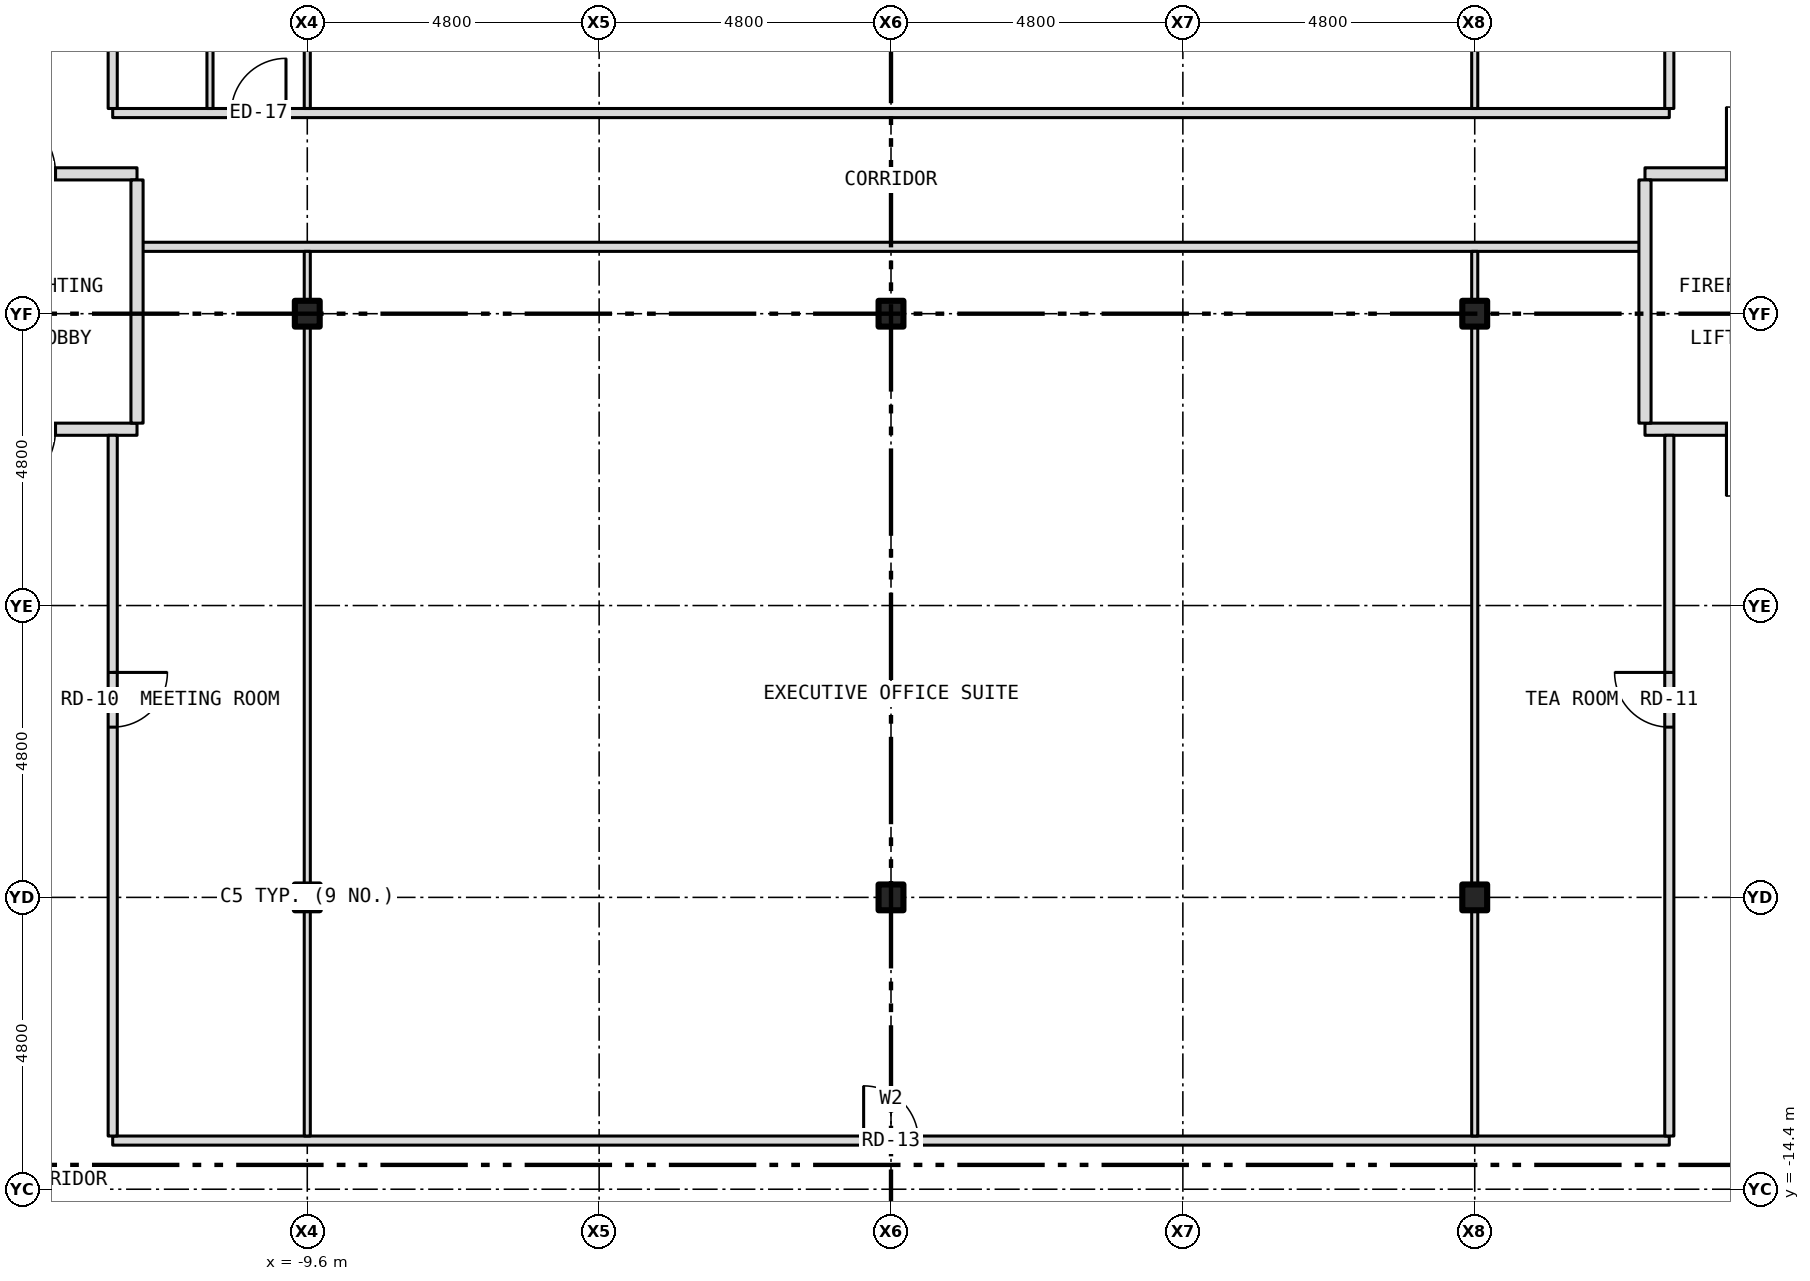
"""IFC4 building model, lengths in metres.
Left out: names, types, materials, properties, quantities, classifications, styles, units other than length and angle.
Written with IfcOpenShell. Run it as: python <this file> out.ifc"""

import sys

from ifc_helpers import new_model, si_unit, direction, frame, frame_2d, origin, origin_2d, place, context, subcontext, project, spatial, rectangle, i_section, extrude, element, fill, save


model = new_model("IFC4")
c1 = context("Model", 3, precision=1e-05, world=origin(), true_north=direction((0.0, 1.0)))
c2 = subcontext(c1, "Body", "Model", "MODEL_VIEW")
j1 = project(units=[si_unit("LENGTHUNIT", "METRE"), si_unit("PLANEANGLEUNIT", "RADIAN")], contexts=[c1])
p1 = place(None, origin())
s1 = spatial("IfcSite", under=j1, at=p1, CompositionType="ELEMENT")
p2 = place(p1, origin())
s2 = spatial("IfcBuilding", under=s1, at=p2, CompositionType="ELEMENT")
p3 = place(p2, frame((0.0, 0.0, 46.0)))
s3 = spatial("IfcBuildingStorey", under=s2, at=p3, CompositionType="ELEMENT", Elevation=46.0)
for number, where, z_axis, x_axis in (
    (1, (-9.6, -9.6, -0.15), (0.0, 0.0, 1.0), (1.0, 0.0, 0.0)),
    (2, (-9.6, 0.0, -0.15), (0.0, 0.0, 1.0), (1.0, 0.0, 0.0)),
    (3, (0.0, -9.6, -0.15), (0.0, 0.0, 1.0), (1.0, 0.0, 0.0)),
    (4, (0.0, 0.0, -0.15), (0.0, 0.0, 1.0), (1.0, 0.0, 0.0)),
    (5, (9.6, -9.6, -0.15), (0.0, 0.0, 1.0), (1.0, 0.0, 0.0)),
    (6, (9.6, 0.0, -0.15), (0.0, 0.0, 1.0), (1.0, 0.0, 0.0)),
):
    element("IfcColumn", number, at=place(p3, frame(where, z_axis=z_axis, x_axis=x_axis)), inside=s3, PredefinedType="COLUMN", context=c2, shape_type="SweptSolid", body=[
        extrude(i_section(OverallWidth=0.409, OverallDepth=0.424, WebThickness=0.033, FlangeThickness=0.052, at=origin_2d()), origin(), (0.0, 0.0, 1.0), 3.5),
    ])
p4 = place(p3, frame((-12.8, -13.6, 0.0), z_axis=(0.0, 0.0, 1.0), x_axis=(1.0, 0.0, 0.0)))
e7 = element("IfcWall", 7, at=p4, inside=s3, PredefinedType="PARTITIONING", context=c2, shape_type="SweptSolid", body=[
    extrude(rectangle(XDim=25.6, YDim=0.15, at=frame_2d((12.8, 0.0))), origin(), (0.0, 0.0, 1.0), 3.35),
])
p5 = place(p4, frame((12.35, 0.0, 0.0)))
e8 = element("IfcOpeningElement", 8, at=p5, cuts=e7, PredefinedType="OPENING", context=c2, shape_type="SweptSolid", body=[
    extrude(rectangle(XDim=0.9, YDim=2.1, at=frame_2d((0.45, 1.05))), frame((0.0, 0.087, 0.0), z_axis=(0.0, -1.0, 0.0), x_axis=(1.0, 0.0, 0.0)), (0.0, 0.0, 1.0), 0.174),
])
p6 = place(p3, frame((-15.68, -1.9, 0.0), z_axis=(0.0, 0.0, 1.0), x_axis=(1.0, 0.0, 0.0)))
e9 = element("IfcWall", 9, at=p6, inside=s3, PredefinedType="PARTITIONING", context=c2, shape_type="SweptSolid", body=[
    extrude(rectangle(XDim=3.28, YDim=0.2, at=frame_2d((1.64, 0.0))), origin(), (0.0, 0.0, 1.0), 3.35),
])
p7 = place(p6, frame((0.84, 0.0, 0.0)))
e10 = element("IfcOpeningElement", 10, at=p7, cuts=e9, PredefinedType="OPENING", context=c2, shape_type="SweptSolid", body=[
    extrude(rectangle(XDim=1.1, YDim=2.1, at=frame_2d((0.55, 1.05))), frame((0.0, 0.112, 0.0), z_axis=(0.0, -1.0, 0.0), x_axis=(1.0, 0.0, 0.0)), (0.0, 0.0, 1.0), 0.224),
])
p8 = place(p3, frame((12.4, -1.9, 0.0), z_axis=(0.0, 0.0, 1.0), x_axis=(1.0, 0.0, 0.0)))
e11 = element("IfcWall", 11, at=p8, inside=s3, PredefinedType="PARTITIONING", context=c2, shape_type="SweptSolid", body=[
    extrude(rectangle(XDim=3.28, YDim=0.2, at=frame_2d((1.64, 0.0))), origin(), (0.0, 0.0, 1.0), 3.35),
])
p9 = place(p8, frame((1.34, 0.0, 0.0)))
e12 = element("IfcOpeningElement", 12, at=p9, cuts=e11, PredefinedType="OPENING", context=c2, shape_type="SweptSolid", body=[
    extrude(rectangle(XDim=1.1, YDim=2.1, at=frame_2d((0.55, 1.05))), frame((0.0, 0.112, 0.0), z_axis=(0.0, -1.0, 0.0), x_axis=(1.0, 0.0, 0.0)), (0.0, 0.0, 1.0), 0.224),
])
p10 = place(p3, frame((-12.4, 1.1, 0.0), z_axis=(0.0, 0.0, 1.0), x_axis=(1.0, 0.0, 0.0)))
e13 = element("IfcWall", 13, at=p10, inside=s3, PredefinedType="PARTITIONING", context=c2, shape_type="SweptSolid", body=[
    extrude(rectangle(XDim=24.8, YDim=0.15, at=frame_2d((12.4, 0.0))), origin(), (0.0, 0.0, 1.0), 3.35),
])
p11 = place(p3, frame((-15.68, 2.3, 0.0), z_axis=(0.0, 0.0, 1.0), x_axis=(1.0, 0.0, 0.0)))
e14 = element("IfcWall", 14, at=p11, inside=s3, PredefinedType="PARTITIONING", context=c2, shape_type="SweptSolid", body=[
    extrude(rectangle(XDim=3.28, YDim=0.2, at=frame_2d((1.64, 0.0))), origin(), (0.0, 0.0, 1.0), 3.35),
])
p12 = place(p11, frame((0.84, 0.0, 0.0)))
e15 = element("IfcOpeningElement", 15, at=p12, cuts=e14, PredefinedType="OPENING", context=c2, shape_type="SweptSolid", body=[
    extrude(rectangle(XDim=1.1, YDim=2.1, at=frame_2d((0.55, 1.05))), frame((0.0, 0.112, 0.0), z_axis=(0.0, -1.0, 0.0), x_axis=(1.0, 0.0, 0.0)), (0.0, 0.0, 1.0), 0.224),
])
p13 = place(p3, frame((12.4, 2.3, 0.0), z_axis=(0.0, 0.0, 1.0), x_axis=(1.0, 0.0, 0.0)))
e16 = element("IfcWall", 16, at=p13, inside=s3, PredefinedType="PARTITIONING", context=c2, shape_type="SweptSolid", body=[
    extrude(rectangle(XDim=3.28, YDim=0.2, at=frame_2d((1.64, 0.0))), origin(), (0.0, 0.0, 1.0), 3.35),
])
p14 = place(p13, frame((1.34, 0.0, 0.0)))
e17 = element("IfcOpeningElement", 17, at=p14, cuts=e16, PredefinedType="OPENING", context=c2, shape_type="SweptSolid", body=[
    extrude(rectangle(XDim=1.1, YDim=2.1, at=frame_2d((0.55, 1.05))), frame((0.0, 0.112, 0.0), z_axis=(0.0, -1.0, 0.0), x_axis=(1.0, 0.0, 0.0)), (0.0, 0.0, 1.0), 0.224),
])
p15 = place(p3, frame((-12.8, 3.3, 0.0), z_axis=(0.0, 0.0, 1.0), x_axis=(1.0, 0.0, 0.0)))
e18 = element("IfcWall", 18, at=p15, inside=s3, PredefinedType="PARTITIONING", context=c2, shape_type="SweptSolid", body=[
    extrude(rectangle(XDim=25.6, YDim=0.15, at=frame_2d((12.8, 0.0))), origin(), (0.0, 0.0, 1.0), 3.35),
])
p16 = place(p15, frame((1.95, 0.0, 0.0)))
e19 = element("IfcOpeningElement", 19, at=p16, cuts=e18, PredefinedType="OPENING", context=c2, shape_type="SweptSolid", body=[
    extrude(rectangle(XDim=0.9, YDim=2.1, at=frame_2d((0.45, 1.05))), frame((0.0, 0.087, 0.0), z_axis=(0.0, -1.0, 0.0), x_axis=(1.0, 0.0, 0.0)), (0.0, 0.0, 1.0), 0.174),
])
p17 = place(p3, frame((-12.8, -13.525, 0.0), z_axis=(0.0, 0.0, 1.0), x_axis=(0.0, 1.0, 0.0)))
e20 = element("IfcWall", 20, at=p17, inside=s3, PredefinedType="PARTITIONING", context=c2, shape_type="SweptSolid", body=[
    extrude(rectangle(XDim=11.525, YDim=0.15, at=frame_2d((5.762, 0.0))), origin(), (0.0, 0.0, 1.0), 3.35),
])
p18 = place(p17, frame((6.725, 0.0, 0.0)))
e21 = element("IfcOpeningElement", 21, at=p18, cuts=e20, PredefinedType="OPENING", context=c2, shape_type="SweptSolid", body=[
    extrude(rectangle(XDim=0.9, YDim=2.1, at=frame_2d((0.45, 1.05))), frame((0.0, 0.087, 0.0), z_axis=(0.0, -1.0, 0.0), x_axis=(1.0, 0.0, 0.0)), (0.0, 0.0, 1.0), 0.174),
])
p19 = place(p3, frame((-12.8, 3.375, 0.0), z_axis=(0.0, 0.0, 1.0), x_axis=(0.0, 1.0, 0.0)))
e22 = element("IfcWall", 22, at=p19, inside=s3, PredefinedType="PARTITIONING", context=c2, shape_type="SweptSolid", body=[
    extrude(rectangle(XDim=7.275, YDim=0.15, at=frame_2d((3.637, 0.0))), origin(), (0.0, 0.0, 1.0), 3.35),
])
p20 = place(p19, frame((3.175, 0.0, 0.0)))
e23 = element("IfcOpeningElement", 23, at=p20, cuts=e22, PredefinedType="OPENING", context=c2, shape_type="SweptSolid", body=[
    extrude(rectangle(XDim=0.9, YDim=2.1, at=frame_2d((0.45, 1.05))), frame((0.0, 0.087, 0.0), z_axis=(0.0, -1.0, 0.0), x_axis=(1.0, 0.0, 0.0)), (0.0, 0.0, 1.0), 0.174),
])
p21 = place(p3, frame((-12.4, -1.8, 0.0), z_axis=(0.0, 0.0, 1.0), x_axis=(0.0, 1.0, 0.0)))
e24 = element("IfcWall", 24, at=p21, inside=s3, PredefinedType="PARTITIONING", context=c2, shape_type="SweptSolid", body=[
    extrude(rectangle(XDim=4.0, YDim=0.2, at=frame_2d((2.0, 0.0))), origin(), (0.0, 0.0, 1.0), 3.35),
])
p22 = place(p3, frame((-11.2, 3.375, 0.0), z_axis=(0.0, 0.0, 1.0), x_axis=(0.0, 1.0, 0.0)))
e25 = element("IfcWall", 25, at=p22, inside=s3, PredefinedType="PARTITIONING", context=c2, shape_type="SweptSolid", body=[
    extrude(rectangle(XDim=10.15, YDim=0.1, at=frame_2d((5.075, 0.0))), origin(), (0.0, 0.0, 1.0), 3.35),
])
p23 = place(p3, frame((-9.6, -13.525, 0.0), z_axis=(0.0, 0.0, 1.0), x_axis=(0.0, 1.0, 0.0)))
e26 = element("IfcWall", 26, at=p23, inside=s3, PredefinedType="PARTITIONING", context=c2, shape_type="SweptSolid", body=[
    extrude(rectangle(XDim=3.721, YDim=0.1, at=frame_2d((1.86, 0.0))), origin(), (0.0, 0.0, 1.0), 2.728),
])
p24 = place(p3, frame((-9.6, -9.804, 0.0), z_axis=(0.0, 0.0, 1.0), x_axis=(0.0, 1.0, 0.0)))
e27 = element("IfcWall", 27, at=p24, inside=s3, PredefinedType="PARTITIONING", context=c2, shape_type="SweptSolid", body=[
    extrude(rectangle(XDim=0.408, YDim=0.1, at=frame_2d((0.204, 0.0))), origin(), (0.0, 0.0, 1.0), 3.35),
])
p25 = place(p3, frame((-9.6, -9.396, 0.0), z_axis=(0.0, 0.0, 1.0), x_axis=(0.0, 1.0, 0.0)))
e28 = element("IfcWall", 28, at=p25, inside=s3, PredefinedType="PARTITIONING", context=c2, shape_type="SweptSolid", body=[
    extrude(rectangle(XDim=9.192, YDim=0.1, at=frame_2d((4.596, 0.0))), origin(), (0.0, 0.0, 1.0), 2.728),
])
p26 = place(p3, frame((-9.6, -0.204, 0.0), z_axis=(0.0, 0.0, 1.0), x_axis=(0.0, 1.0, 0.0)))
e29 = element("IfcWall", 29, at=p26, inside=s3, PredefinedType="PARTITIONING", context=c2, shape_type="SweptSolid", body=[
    extrude(rectangle(XDim=0.408, YDim=0.1, at=frame_2d((0.204, 0.0))), origin(), (0.0, 0.0, 1.0), 3.35),
])
p27 = place(p3, frame((-9.6, 0.204, 0.0), z_axis=(0.0, 0.0, 1.0), x_axis=(0.0, 1.0, 0.0)))
e30 = element("IfcWall", 30, at=p27, inside=s3, PredefinedType="PARTITIONING", context=c2, shape_type="SweptSolid", body=[
    extrude(rectangle(XDim=0.821, YDim=0.1, at=frame_2d((0.41, 0.0))), origin(), (0.0, 0.0, 1.0), 2.728),
])
p28 = place(p3, frame((-9.6, 3.375, 0.0), z_axis=(0.0, 0.0, 1.0), x_axis=(0.0, 1.0, 0.0)))
e31 = element("IfcWall", 31, at=p28, inside=s3, PredefinedType="PARTITIONING", context=c2, shape_type="SweptSolid", body=[
    extrude(rectangle(XDim=6.021, YDim=0.1, at=frame_2d((3.01, 0.0))), origin(), (0.0, 0.0, 1.0), 2.728),
])
p29 = place(p3, frame((9.6, -13.525, 0.0), z_axis=(0.0, 0.0, 1.0), x_axis=(0.0, 1.0, 0.0)))
e32 = element("IfcWall", 32, at=p29, inside=s3, PredefinedType="PARTITIONING", context=c2, shape_type="SweptSolid", body=[
    extrude(rectangle(XDim=3.721, YDim=0.1, at=frame_2d((1.86, 0.0))), origin(), (0.0, 0.0, 1.0), 2.728),
])
p30 = place(p3, frame((9.6, -9.804, 0.0), z_axis=(0.0, 0.0, 1.0), x_axis=(0.0, 1.0, 0.0)))
e33 = element("IfcWall", 33, at=p30, inside=s3, PredefinedType="PARTITIONING", context=c2, shape_type="SweptSolid", body=[
    extrude(rectangle(XDim=0.408, YDim=0.1, at=frame_2d((0.204, 0.0))), origin(), (0.0, 0.0, 1.0), 3.35),
])
p31 = place(p3, frame((9.6, -9.396, 0.0), z_axis=(0.0, 0.0, 1.0), x_axis=(0.0, 1.0, 0.0)))
e34 = element("IfcWall", 34, at=p31, inside=s3, PredefinedType="PARTITIONING", context=c2, shape_type="SweptSolid", body=[
    extrude(rectangle(XDim=9.192, YDim=0.1, at=frame_2d((4.596, 0.0))), origin(), (0.0, 0.0, 1.0), 2.728),
])
p32 = place(p3, frame((9.6, -0.204, 0.0), z_axis=(0.0, 0.0, 1.0), x_axis=(0.0, 1.0, 0.0)))
e35 = element("IfcWall", 35, at=p32, inside=s3, PredefinedType="PARTITIONING", context=c2, shape_type="SweptSolid", body=[
    extrude(rectangle(XDim=0.408, YDim=0.1, at=frame_2d((0.204, 0.0))), origin(), (0.0, 0.0, 1.0), 3.35),
])
p33 = place(p3, frame((9.6, 0.204, 0.0), z_axis=(0.0, 0.0, 1.0), x_axis=(0.0, 1.0, 0.0)))
e36 = element("IfcWall", 36, at=p33, inside=s3, PredefinedType="PARTITIONING", context=c2, shape_type="SweptSolid", body=[
    extrude(rectangle(XDim=0.821, YDim=0.1, at=frame_2d((0.41, 0.0))), origin(), (0.0, 0.0, 1.0), 2.728),
])
p34 = place(p3, frame((9.6, 3.375, 0.0), z_axis=(0.0, 0.0, 1.0), x_axis=(0.0, 1.0, 0.0)))
e37 = element("IfcWall", 37, at=p34, inside=s3, PredefinedType="PARTITIONING", context=c2, shape_type="SweptSolid", body=[
    extrude(rectangle(XDim=6.021, YDim=0.1, at=frame_2d((3.01, 0.0))), origin(), (0.0, 0.0, 1.0), 2.728),
])
p35 = place(p3, frame((12.4, -1.8, 0.0), z_axis=(0.0, 0.0, 1.0), x_axis=(0.0, 1.0, 0.0)))
e38 = element("IfcWall", 38, at=p35, inside=s3, PredefinedType="PARTITIONING", context=c2, shape_type="SweptSolid", body=[
    extrude(rectangle(XDim=4.0, YDim=0.2, at=frame_2d((2.0, 0.0))), origin(), (0.0, 0.0, 1.0), 3.35),
])
p36 = place(p3, frame((12.8, -13.525, 0.0), z_axis=(0.0, 0.0, 1.0), x_axis=(0.0, 1.0, 0.0)))
e39 = element("IfcWall", 39, at=p36, inside=s3, PredefinedType="PARTITIONING", context=c2, shape_type="SweptSolid", body=[
    extrude(rectangle(XDim=11.525, YDim=0.15, at=frame_2d((5.762, 0.0))), origin(), (0.0, 0.0, 1.0), 3.35),
])
p37 = place(p36, frame((6.725, 0.0, 0.0)))
e40 = element("IfcOpeningElement", 40, at=p37, cuts=e39, PredefinedType="OPENING", context=c2, shape_type="SweptSolid", body=[
    extrude(rectangle(XDim=0.9, YDim=2.1, at=frame_2d((0.45, 1.05))), frame((0.0, 0.087, 0.0), z_axis=(0.0, -1.0, 0.0), x_axis=(1.0, 0.0, 0.0)), (0.0, 0.0, 1.0), 0.174),
])
p38 = place(p3, frame((12.8, 3.375, 0.0), z_axis=(0.0, 0.0, 1.0), x_axis=(0.0, 1.0, 0.0)))
e41 = element("IfcWall", 41, at=p38, inside=s3, PredefinedType="PARTITIONING", context=c2, shape_type="SweptSolid", body=[
    extrude(rectangle(XDim=7.275, YDim=0.15, at=frame_2d((3.637, 0.0))), origin(), (0.0, 0.0, 1.0), 3.35),
])
p39 = place(p38, frame((3.175, 0.0, 0.0)))
e42 = element("IfcOpeningElement", 42, at=p39, cuts=e41, PredefinedType="OPENING", context=c2, shape_type="SweptSolid", body=[
    extrude(rectangle(XDim=0.9, YDim=2.1, at=frame_2d((0.45, 1.05))), frame((0.0, 0.087, 0.0), z_axis=(0.0, -1.0, 0.0), x_axis=(1.0, 0.0, 0.0)), (0.0, 0.0, 1.0), 0.174),
])
p40 = place(p12, origin())
e43 = element("IfcDoor", 43, at=p40, inside=s3, OperationType="SINGLE_SWING_LEFT", PredefinedType="DOOR", context=c2, shape_type="SweptSolid", body=[
    extrude(rectangle(XDim=1.1, YDim=2.1, at=frame_2d((0.55, 1.05))), frame((0.0, 0.025, 0.0), z_axis=(0.0, -1.0, 0.0), x_axis=(1.0, 0.0, 0.0)), (0.0, 0.0, 1.0), 0.05),
])
fill(e15, e43)
p41 = place(p7, origin())
e44 = element("IfcDoor", 44, at=p41, inside=s3, OperationType="SINGLE_SWING_LEFT", PredefinedType="DOOR", context=c2, shape_type="SweptSolid", body=[
    extrude(rectangle(XDim=1.1, YDim=2.1, at=frame_2d((0.55, 1.05))), frame((0.0, 0.025, 0.0), z_axis=(0.0, -1.0, 0.0), x_axis=(1.0, 0.0, 0.0)), (0.0, 0.0, 1.0), 0.05),
])
fill(e10, e44)
p42 = place(p14, origin())
e45 = element("IfcDoor", 45, at=p42, inside=s3, OperationType="SINGLE_SWING_LEFT", PredefinedType="DOOR", context=c2, shape_type="SweptSolid", body=[
    extrude(rectangle(XDim=1.1, YDim=2.1, at=frame_2d((0.55, 1.05))), frame((0.0, 0.025, 0.0), z_axis=(0.0, -1.0, 0.0), x_axis=(1.0, 0.0, 0.0)), (0.0, 0.0, 1.0), 0.05),
])
fill(e17, e45)
p43 = place(p9, origin())
e46 = element("IfcDoor", 46, at=p43, inside=s3, OperationType="SINGLE_SWING_LEFT", PredefinedType="DOOR", context=c2, shape_type="SweptSolid", body=[
    extrude(rectangle(XDim=1.1, YDim=2.1, at=frame_2d((0.55, 1.05))), frame((0.0, 0.025, 0.0), z_axis=(0.0, -1.0, 0.0), x_axis=(1.0, 0.0, 0.0)), (0.0, 0.0, 1.0), 0.05),
])
fill(e12, e46)
p44 = place(p16, origin())
e47 = element("IfcDoor", 47, at=p44, inside=s3, OperationType="SINGLE_SWING_RIGHT", PredefinedType="DOOR", context=c2, shape_type="SweptSolid", body=[
    extrude(rectangle(XDim=0.9, YDim=2.1, at=frame_2d((0.45, 1.05))), frame((0.0, 0.025, 0.0), z_axis=(0.0, -1.0, 0.0), x_axis=(1.0, 0.0, 0.0)), (0.0, 0.0, 1.0), 0.05),
])
fill(e19, e47)
p45 = place(p18, origin())
e48 = element("IfcDoor", 48, at=p45, inside=s3, OperationType="SINGLE_SWING_RIGHT", PredefinedType="DOOR", context=c2, shape_type="SweptSolid", body=[
    extrude(rectangle(XDim=0.9, YDim=2.1, at=frame_2d((0.45, 1.05))), frame((0.0, 0.025, 0.0), z_axis=(0.0, -1.0, 0.0), x_axis=(1.0, 0.0, 0.0)), (0.0, 0.0, 1.0), 0.05),
])
fill(e21, e48)
p46 = place(p37, origin())
e49 = element("IfcDoor", 49, at=p46, inside=s3, OperationType="SINGLE_SWING_RIGHT", PredefinedType="DOOR", context=c2, shape_type="SweptSolid", body=[
    extrude(rectangle(XDim=0.9, YDim=2.1, at=frame_2d((0.45, 1.05))), frame((0.0, 0.025, 0.0), z_axis=(0.0, -1.0, 0.0), x_axis=(1.0, 0.0, 0.0)), (0.0, 0.0, 1.0), 0.05),
])
fill(e40, e49)
p47 = place(p5, origin())
e50 = element("IfcDoor", 50, at=p47, inside=s3, OperationType="SINGLE_SWING_LEFT", PredefinedType="DOOR", context=c2, shape_type="SweptSolid", body=[
    extrude(rectangle(XDim=0.9, YDim=2.1, at=frame_2d((0.45, 1.05))), frame((0.0, 0.025, 0.0), z_axis=(0.0, -1.0, 0.0), x_axis=(1.0, 0.0, 0.0)), (0.0, 0.0, 1.0), 0.05),
])
fill(e8, e50)
save(model, sys.argv[1])
